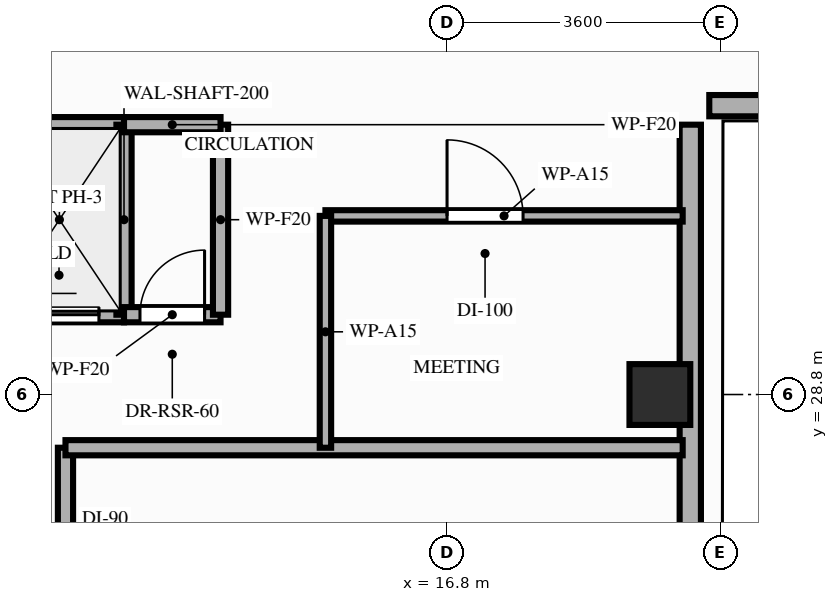
"""IFC4 building model, lengths in metres.
Left out: names, types, materials, properties, quantities, classifications, styles, units other than length and angle.
Written with IfcOpenShell. Run it as: python <this file> out.ifc"""

import sys

from ifc_helpers import new_model, si_unit, direction, frame, frame_2d, origin, origin_2d, place, context, subcontext, project, spatial, rectangle, extrude, element, fill, save


model = new_model("IFC4")
c1 = context("Model", 3, precision=1e-05, world=origin(), true_north=direction((0.0, 1.0)))
c2 = subcontext(c1, "Body", "Model", "MODEL_VIEW")
j1 = project(units=[si_unit("LENGTHUNIT", "METRE"), si_unit("PLANEANGLEUNIT", "RADIAN")], contexts=[c1])
p1 = place(None, origin())
s1 = spatial("IfcSite", under=j1, at=p1, CompositionType="ELEMENT")
p2 = place(p1, origin())
s2 = spatial("IfcBuilding", under=s1, at=p2, CompositionType="ELEMENT")
p3 = place(p2, frame((0.0, 0.0, 247.2)))
s3 = spatial("IfcBuildingStorey", under=s2, at=p3, CompositionType="ELEMENT", Elevation=247.2)
p4 = place(p3, frame((19.6, 28.8, 0.0), z_axis=(0.0, 0.0, 1.0), x_axis=(1.0, 0.0, 0.0)))
e1 = element("IfcColumn", 1, at=p4, inside=s3, PredefinedType="COLUMN", context=c2, shape_type="SweptSolid", body=[
    extrude(rectangle(XDim=0.8, YDim=0.8, at=origin_2d()), origin(), (0.0, 0.0, 1.0), 3.2),
])
p5 = place(p3, frame((20.0, 10.8, 0.0), z_axis=(0.0, 0.0, 1.0), x_axis=(0.0, 1.0, 0.0)))
e2 = element("IfcWall", 2, at=p5, inside=s3, PredefinedType="STANDARD", context=c2, shape_type="SweptSolid", body=[
    extrude(rectangle(XDim=21.55, YDim=0.28, at=frame_2d((10.775, 0.0))), origin(), (0.0, 0.0, 1.0), 2.5),
])
p6 = place(p5, frame((9.02, 0.0, 0.85)))
e3 = element("IfcOpeningElement", 3, at=p6, cuts=e2, PredefinedType="OPENING", context=c2, shape_type="SweptSolid", body=[
    extrude(rectangle(XDim=2.6, YDim=1.4, at=frame_2d((1.3, 0.7))), frame((0.0, 0.15, 0.0), z_axis=(0.0, -1.0, 0.0), x_axis=(1.0, 0.0, 0.0)), (0.0, 0.0, 1.0), 0.3),
])
p7 = place(p3, frame((20.25, 32.6, 0.0), z_axis=(0.0, 0.0, 1.0), x_axis=(1.0, 0.0, 0.0)))
e4 = element("IfcWall", 4, at=p7, inside=s3, PredefinedType="STANDARD", context=c2, shape_type="SweptSolid", body=[
    extrude(rectangle(XDim=7.35, YDim=0.28, at=frame_2d((3.675, 0.0))), origin(), (0.0, 0.0, 1.0), 2.5),
])
p8 = place(p3, frame((7.0, 29.85, 0.0), z_axis=(0.0, 0.0, 1.0), x_axis=(1.0, 0.0, 0.0)))
e5 = element("IfcWall", 5, at=p8, inside=s3, PredefinedType="MOVABLE", context=c2, shape_type="SweptSolid", body=[
    extrude(rectangle(XDim=5.55, YDim=0.2, at=frame_2d((2.775, 0.0))), origin(), (0.0, 0.0, 1.0), 2.96),
])
p9 = place(p8, frame((0.38, 0.0, 0.0)))
e6 = element("IfcOpeningElement", 6, at=p9, cuts=e5, PredefinedType="OPENING", context=c2, shape_type="SweptSolid", body=[
    extrude(rectangle(XDim=1.05, YDim=2.15, at=frame_2d((0.525, 1.075))), frame((0.0, 0.11, 0.0), z_axis=(0.0, -1.0, 0.0), x_axis=(1.0, 0.0, 0.0)), (0.0, 0.0, 1.0), 0.22),
])
p10 = place(p8, frame((2.28, 0.0, 0.0)))
e7 = element("IfcOpeningElement", 7, at=p10, cuts=e5, PredefinedType="OPENING", context=c2, shape_type="SweptSolid", body=[
    extrude(rectangle(XDim=1.05, YDim=2.15, at=frame_2d((0.525, 1.075))), frame((0.0, 0.11, 0.0), z_axis=(0.0, -1.0, 0.0), x_axis=(1.0, 0.0, 0.0)), (0.0, 0.0, 1.0), 0.22),
])
p11 = place(p8, frame((4.17, 0.0, 0.0)))
e8 = element("IfcOpeningElement", 8, at=p11, cuts=e5, PredefinedType="OPENING", context=c2, shape_type="SweptSolid", body=[
    extrude(rectangle(XDim=1.05, YDim=2.15, at=frame_2d((0.525, 1.075))), frame((0.0, 0.11, 0.0), z_axis=(0.0, -1.0, 0.0), x_axis=(1.0, 0.0, 0.0)), (0.0, 0.0, 1.0), 0.22),
])
p12 = place(p3, frame((7.0, 32.35, 0.0), z_axis=(0.0, 0.0, 1.0), x_axis=(1.0, 0.0, 0.0)))
e9 = element("IfcWall", 9, at=p12, inside=s3, PredefinedType="MOVABLE", context=c2, shape_type="SweptSolid", body=[
    extrude(rectangle(XDim=5.55, YDim=0.2, at=frame_2d((2.775, 0.0))), origin(), (0.0, 0.0, 1.0), 2.96),
])
p13 = place(p3, frame((12.55, 29.85, 0.0), z_axis=(0.0, 0.0, 1.0), x_axis=(0.0, 1.0, 0.0)))
e10 = element("IfcWall", 10, at=p13, inside=s3, PredefinedType="MOVABLE", context=c2, shape_type="SweptSolid", body=[
    extrude(rectangle(XDim=2.5, YDim=0.2, at=frame_2d((1.25, 0.0))), origin(), (0.0, 0.0, 1.0), 2.96),
])
p14 = place(p3, frame((12.55, 29.85, 0.0), z_axis=(0.0, 0.0, 1.0), x_axis=(1.0, 0.0, 0.0)))
e11 = element("IfcWall", 11, at=p14, inside=s3, PredefinedType="PARTITIONING", context=c2, shape_type="SweptSolid", body=[
    extrude(rectangle(XDim=1.27, YDim=0.2, at=frame_2d((0.635, 0.0))), origin(), (0.0, 0.0, 1.0), 2.96),
])
p15 = place(p14, frame((0.21, 0.0, 0.0)))
e12 = element("IfcOpeningElement", 12, at=p15, cuts=e11, PredefinedType="OPENING", context=c2, shape_type="SweptSolid", body=[
    extrude(rectangle(XDim=0.85, YDim=2.05, at=frame_2d((0.425, 1.025))), frame((0.0, 0.11, 0.0), z_axis=(0.0, -1.0, 0.0), x_axis=(1.0, 0.0, 0.0)), (0.0, 0.0, 1.0), 0.22),
])
p16 = place(p3, frame((13.82, 29.85, 0.0), z_axis=(0.0, 0.0, 1.0), x_axis=(0.0, 1.0, 0.0)))
e13 = element("IfcWall", 13, at=p16, inside=s3, PredefinedType="PARTITIONING", context=c2, shape_type="SweptSolid", body=[
    extrude(rectangle(XDim=2.5, YDim=0.2, at=frame_2d((1.25, 0.0))), origin(), (0.0, 0.0, 1.0), 2.96),
])
p17 = place(p3, frame((12.55, 32.35, 0.0), z_axis=(0.0, 0.0, 1.0), x_axis=(1.0, 0.0, 0.0)))
e14 = element("IfcWall", 14, at=p17, inside=s3, PredefinedType="PARTITIONING", context=c2, shape_type="SweptSolid", body=[
    extrude(rectangle(XDim=1.27, YDim=0.2, at=frame_2d((0.635, 0.0))), origin(), (0.0, 0.0, 1.0), 2.96),
])
p18 = place(p3, frame((11.78, 13.8, 0.0), z_axis=(0.0, 0.0, 1.0), x_axis=(0.0, 1.0, 0.0)))
e15 = element("IfcWall", 15, at=p18, inside=s3, PredefinedType="PARTITIONING", context=c2, shape_type="SweptSolid", body=[
    extrude(rectangle(XDim=14.3, YDim=0.2, at=frame_2d((7.15, 0.0))), origin(), (0.0, 0.0, 1.0), 2.5),
])
p19 = place(p18, frame((0.42, 0.0, 0.0)))
e16 = element("IfcOpeningElement", 16, at=p19, cuts=e15, PredefinedType="OPENING", context=c2, shape_type="SweptSolid", body=[
    extrude(rectangle(XDim=0.95, YDim=2.1, at=frame_2d((0.475, 1.05))), frame((0.0, 0.11, 0.0), z_axis=(0.0, -1.0, 0.0), x_axis=(1.0, 0.0, 0.0)), (0.0, 0.0, 1.0), 0.22),
])
p20 = place(p18, frame((3.28, 0.0, 0.0)))
e17 = element("IfcOpeningElement", 17, at=p20, cuts=e15, PredefinedType="OPENING", context=c2, shape_type="SweptSolid", body=[
    extrude(rectangle(XDim=0.95, YDim=2.15, at=frame_2d((0.475, 1.075))), frame((0.0, 0.11, 0.0), z_axis=(0.0, -1.0, 0.0), x_axis=(1.0, 0.0, 0.0)), (0.0, 0.0, 1.0), 0.22),
])
p21 = place(p18, frame((7.86, 0.0, 0.0)))
e18 = element("IfcOpeningElement", 18, at=p21, cuts=e15, PredefinedType="OPENING", context=c2, shape_type="SweptSolid", body=[
    extrude(rectangle(XDim=0.95, YDim=2.15, at=frame_2d((0.475, 1.075))), frame((0.0, 0.11, 0.0), z_axis=(0.0, -1.0, 0.0), x_axis=(1.0, 0.0, 0.0)), (0.0, 0.0, 1.0), 0.22),
])
p22 = place(p18, frame((12.12, 0.0, 0.0)))
e19 = element("IfcOpeningElement", 19, at=p22, cuts=e15, PredefinedType="OPENING", context=c2, shape_type="SweptSolid", body=[
    extrude(rectangle(XDim=0.95, YDim=2.15, at=frame_2d((0.475, 1.075))), frame((0.0, 0.11, 0.0), z_axis=(0.0, -1.0, 0.0), x_axis=(1.0, 0.0, 0.0)), (0.0, 0.0, 1.0), 0.22),
])
p23 = place(p3, frame((11.78, 28.1, 0.0), z_axis=(0.0, 0.0, 1.0), x_axis=(1.0, 0.0, 0.0)))
e20 = element("IfcWall", 20, at=p23, inside=s3, PredefinedType="PARTITIONING", context=c2, shape_type="SweptSolid", body=[
    extrude(rectangle(XDim=8.12, YDim=0.2, at=frame_2d((4.06, 0.0))), origin(), (0.0, 0.0, 1.0), 2.5),
])
p24 = place(p3, frame((15.2, 31.15, 0.0), z_axis=(0.0, 0.0, 1.0), x_axis=(1.0, 0.0, 0.0)))
e21 = element("IfcWall", 21, at=p24, inside=s3, PredefinedType="PARTITIONING", context=c2, shape_type="SweptSolid", body=[
    extrude(rectangle(XDim=4.7, YDim=0.15, at=frame_2d((2.35, 0.0))), origin(), (0.0, 0.0, 1.0), 2.5),
])
p25 = place(p24, frame((1.6, 0.0, 0.0)))
e22 = element("IfcOpeningElement", 22, at=p25, cuts=e21, PredefinedType="OPENING", context=c2, shape_type="SweptSolid", body=[
    extrude(rectangle(XDim=1.0, YDim=2.15, at=frame_2d((0.5, 1.075))), frame((0.0, 0.085, 0.0), z_axis=(0.0, -1.0, 0.0), x_axis=(1.0, 0.0, 0.0)), (0.0, 0.0, 1.0), 0.17),
])
p26 = place(p3, frame((15.2, 28.1, 0.0), z_axis=(0.0, 0.0, 1.0), x_axis=(0.0, 1.0, 0.0)))
e23 = element("IfcWall", 23, at=p26, inside=s3, PredefinedType="PARTITIONING", context=c2, shape_type="SweptSolid", body=[
    extrude(rectangle(XDim=3.05, YDim=0.15, at=frame_2d((1.525, 0.0))), origin(), (0.0, 0.0, 1.0), 2.5),
])
p27 = place(p11, origin())
e24 = element("IfcDoor", 24, at=p27, inside=s3, OperationType="SLIDING_TO_LEFT", PredefinedType="DOOR", context=c2, shape_type="SweptSolid", body=[
    extrude(rectangle(XDim=1.05, YDim=2.15, at=frame_2d((0.525, 1.075))), frame((0.0, 0.025, 0.0), z_axis=(0.0, -1.0, 0.0), x_axis=(1.0, 0.0, 0.0)), (0.0, 0.0, 1.0), 0.05),
])
fill(e8, e24)
p28 = place(p15, origin())
e25 = element("IfcDoor", 25, at=p28, inside=s3, OperationType="SINGLE_SWING_RIGHT", PredefinedType="DOOR", context=c2, shape_type="SweptSolid", body=[
    extrude(rectangle(XDim=0.85, YDim=2.05, at=frame_2d((0.425, 1.025))), frame((0.0, 0.025, 0.0), z_axis=(0.0, -1.0, 0.0), x_axis=(1.0, 0.0, 0.0)), (0.0, 0.0, 1.0), 0.05),
])
fill(e12, e25)
p29 = place(p25, origin())
e26 = element("IfcDoor", 26, at=p29, inside=s3, OperationType="SINGLE_SWING_LEFT", PredefinedType="DOOR", context=c2, shape_type="SweptSolid", body=[
    extrude(rectangle(XDim=1.0, YDim=2.15, at=frame_2d((0.5, 1.075))), frame((0.0, 0.025, 0.0), z_axis=(0.0, -1.0, 0.0), x_axis=(1.0, 0.0, 0.0)), (0.0, 0.0, 1.0), 0.05),
])
fill(e22, e26)
save(model, sys.argv[1])
